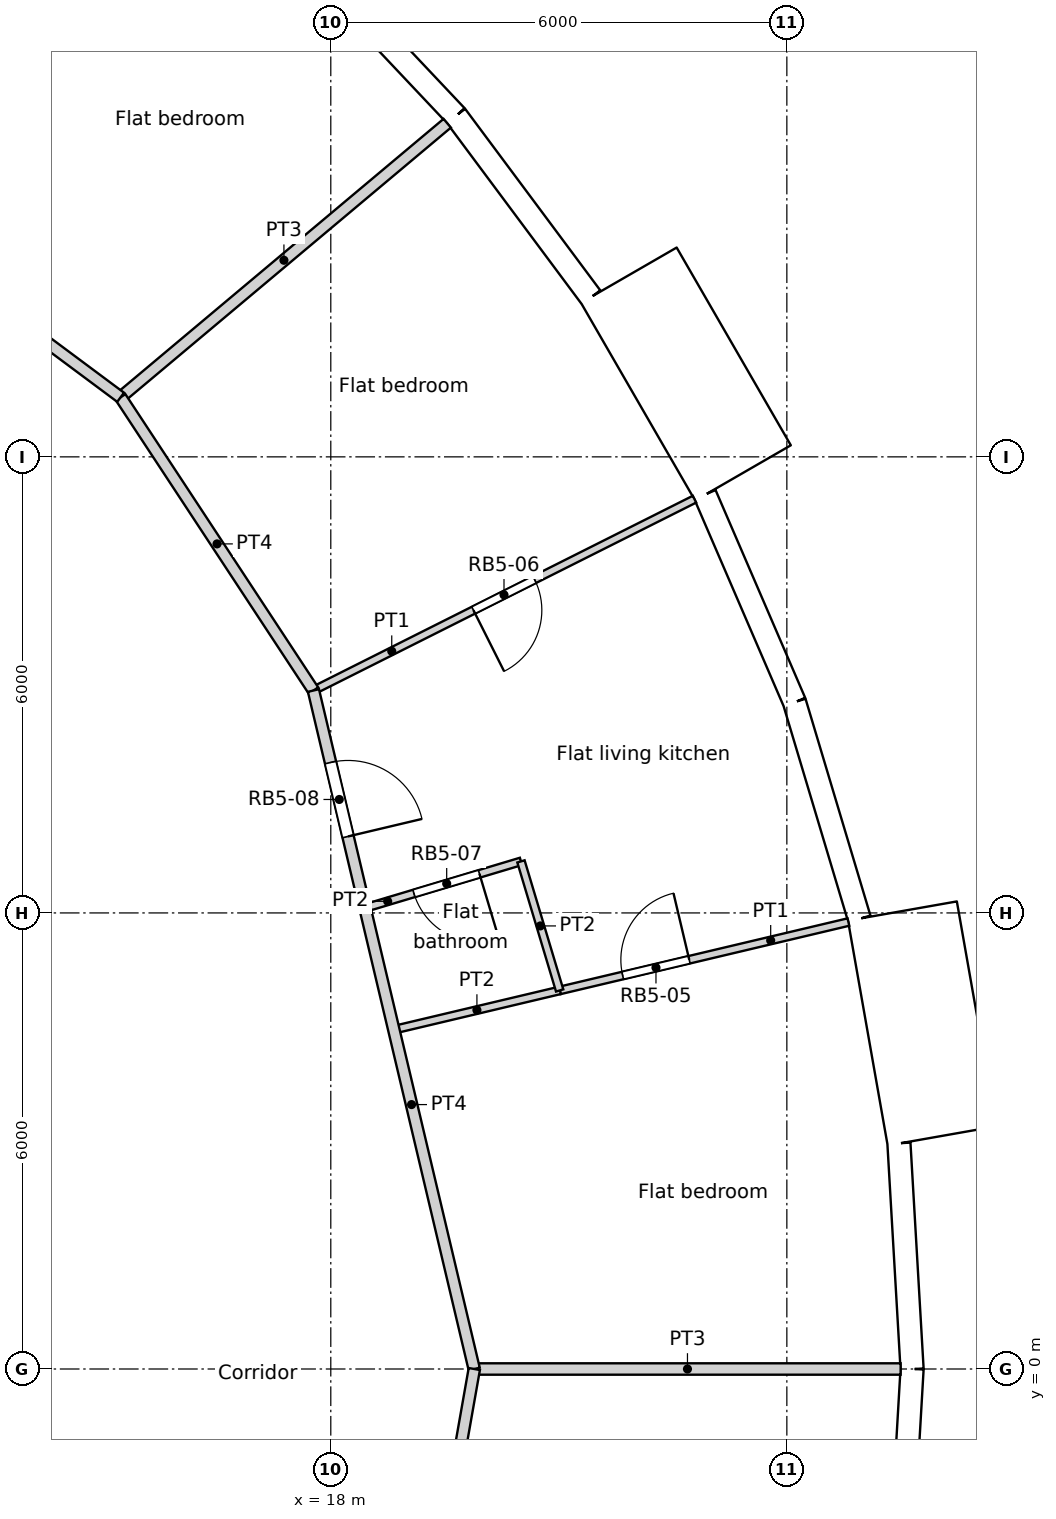
"""IFC4 building model, lengths in metres.
Left out: names, types, materials, properties, quantities, classifications, styles, units other than length and angle.
Written with IfcOpenShell. Run it as: python <this file> out.ifc"""

import sys

from ifc_helpers import new_model, si_unit, direction, frame, frame_2d, origin, origin_2d, place, context, subcontext, project, spatial, rectangle, circle, extrude, element, fill, save


model = new_model("IFC4")
c1 = context("Model", 3, precision=1e-05, world=origin(), true_north=direction((0.0, 1.0)))
c2 = subcontext(c1, "Body", "Model", "MODEL_VIEW")
j1 = project(units=[si_unit("LENGTHUNIT", "METRE"), si_unit("PLANEANGLEUNIT", "RADIAN")], contexts=[c1])
p1 = place(None, origin())
s1 = spatial("IfcSite", under=j1, at=p1, CompositionType="ELEMENT")
p2 = place(p1, origin())
s2 = spatial("IfcBuilding", under=s1, at=p2, CompositionType="ELEMENT")
p3 = place(p2, frame((0.0, 0.0, 169.2)))
s3 = spatial("IfcBuildingStorey", under=s2, at=p3, CompositionType="ELEMENT", Elevation=169.2)
for number, where, z_axis, x_axis in (
    (1, (24.548, 0.0, 0.0), (0.0, 0.0, 1.0), (1.0, 0.0, 0.0)),
    (2, (23.886, 5.661, 0.0), (0.0, 0.0, 1.0), (1.0, 0.0, 0.0)),
    (3, (21.937, 11.017, 0.0), (0.0, 0.0, 1.0), (1.0, 0.0, 0.0)),
    (4, (18.805, 15.779, 0.0), (0.0, 0.0, 1.0), (1.0, 0.0, 0.0)),
):
    element("IfcColumn", number, at=place(p3, frame(where, z_axis=z_axis, x_axis=x_axis)), inside=s3, PredefinedType="COLUMN", context=c2, shape_type="SweptSolid", body=[
        extrude(circle(Radius=0.6, at=origin_2d()), origin(), (0.0, 0.0, 1.0), 3.6),
    ])
for number, where, z_axis, x_axis in (
    (5, (18.822, 0.0, 0.0), (0.0, 0.0, 1.0), (1.0, 0.0, 0.0)),
    (6, (17.986, 5.548, 0.0), (0.0, 0.0, 1.0), (1.0, 0.0, 0.0)),
    (7, (15.552, 10.603, 0.0), (0.0, 0.0, 1.0), (1.0, 0.0, 0.0)),
):
    element("IfcColumn", number, at=place(p3, frame(where, z_axis=z_axis, x_axis=x_axis)), inside=s3, PredefinedType="COLUMN", context=c2, shape_type="SweptSolid", body=[
        extrude(circle(Radius=0.65, at=origin_2d()), origin(), (0.0, 0.0, 1.0), 3.6),
    ])
p4 = place(p3, frame((25.647, 0.0, 0.0), z_axis=(0.0, 0.0, 1.0), x_axis=(-0.058144307138, 0.998308188661, 0.0)))
e8 = element("IfcWall", 8, at=p4, inside=s3, PredefinedType="SOLIDWALL", context=c2, shape_type="SweptSolid", body=[
    extrude(rectangle(XDim=2.973, YDim=0.3, at=frame_2d((1.486, 0.0))), origin(), (0.0, 0.0, 1.0), 3.3),
])
p5 = place(p4, frame((1.486, 0.0, 1.55)))
e9 = element("IfcOpeningElement", 9, at=p5, cuts=e8, PredefinedType="OPENING", context=c2, shape_type="SweptSolid", body=[
    extrude(circle(Radius=0.9, at=origin_2d()), frame((0.0, 0.16, 0.0), z_axis=(0.0, -1.0, 0.0), x_axis=(1.0, 0.0, 0.0)), (0.0, 0.0, 1.0), 0.32),
])
p6 = place(p3, frame((26.042, 3.069, -0.3), z_axis=(0.0, 0.0, 1.0), x_axis=(-0.173669267716, 0.984804034035, 0.0)))
e10 = element("IfcWall", 10, at=p6, inside=s3, PredefinedType="ELEMENTEDWALL", context=c2, shape_type="SweptSolid", body=[
    extrude(rectangle(XDim=3.0, YDim=1.45, at=frame_2d((1.5, 0.0))), origin(), (0.0, 0.0, 1.0), 3.6),
])
p7 = place(p6, frame((1.5, 0.0, 1.85)))
e11 = element("IfcOpeningElement", 11, at=p7, cuts=e10, PredefinedType="OPENING", context=c2, shape_type="SweptSolid", body=[
    extrude(circle(Radius=0.9, at=origin_2d()), frame((0.0, 0.735, 0.0), z_axis=(0.0, -1.0, 0.0), x_axis=(1.0, 0.0, 0.0)), (0.0, 0.0, 1.0), 1.47),
])
p8 = place(p3, frame((24.953, 5.924, 0.0), z_axis=(0.0, 0.0, 1.0), x_axis=(-0.286782750849, 0.957995643944, 0.0)))
e12 = element("IfcWall", 12, at=p8, inside=s3, PredefinedType="SOLIDWALL", context=c2, shape_type="SweptSolid", body=[
    extrude(rectangle(XDim=2.973, YDim=0.3, at=frame_2d((1.486, 0.0))), origin(), (0.0, 0.0, 1.0), 3.3),
])
p9 = place(p8, frame((1.486, 0.0, 1.55)))
e13 = element("IfcOpeningElement", 13, at=p9, cuts=e12, PredefinedType="OPENING", context=c2, shape_type="SweptSolid", body=[
    extrude(circle(Radius=0.9, at=origin_2d()), frame((0.0, 0.16, 0.0), z_axis=(0.0, -1.0, 0.0), x_axis=(1.0, 0.0, 0.0)), (0.0, 0.0, 1.0), 0.32),
])
p10 = place(p3, frame((24.101, 8.772, 0.0), z_axis=(0.0, 0.0, 1.0), x_axis=(-0.396148129016, 0.918186614952, 0.0)))
e14 = element("IfcWall", 14, at=p10, inside=s3, PredefinedType="SOLIDWALL", context=c2, shape_type="SweptSolid", body=[
    extrude(rectangle(XDim=2.973, YDim=0.3, at=frame_2d((1.486, 0.0))), origin(), (0.0, 0.0, 1.0), 3.3),
])
p11 = place(p10, frame((1.486, 0.0, 1.55)))
e15 = element("IfcOpeningElement", 15, at=p11, cuts=e14, PredefinedType="OPENING", context=c2, shape_type="SweptSolid", body=[
    extrude(circle(Radius=0.9, at=origin_2d()), frame((0.0, 0.16, 0.0), z_axis=(0.0, -1.0, 0.0), x_axis=(1.0, 0.0, 0.0)), (0.0, 0.0, 1.0), 0.32),
])
p12 = place(p3, frame((23.422, 11.791, -0.3), z_axis=(0.0, 0.0, 1.0), x_axis=(-0.499990139034, 0.866031096941, 0.0)))
e16 = element("IfcWall", 16, at=p12, inside=s3, PredefinedType="ELEMENTEDWALL", context=c2, shape_type="SweptSolid", body=[
    extrude(rectangle(XDim=3.0, YDim=1.45, at=frame_2d((1.5, 0.0))), origin(), (0.0, 0.0, 1.0), 3.6),
])
p13 = place(p12, frame((1.5, 0.0, 1.85)))
e17 = element("IfcOpeningElement", 17, at=p13, cuts=e16, PredefinedType="OPENING", context=c2, shape_type="SweptSolid", body=[
    extrude(circle(Radius=0.9, at=origin_2d()), frame((0.0, 0.735, 0.0), z_axis=(0.0, -1.0, 0.0), x_axis=(1.0, 0.0, 0.0)), (0.0, 0.0, 1.0), 1.47),
])
p14 = place(p3, frame((21.422, 14.101, 0.0), z_axis=(0.0, 0.0, 1.0), x_axis=(-0.597197580538, 0.80209416517, 0.0)))
e18 = element("IfcWall", 18, at=p14, inside=s3, PredefinedType="SOLIDWALL", context=c2, shape_type="SweptSolid", body=[
    extrude(rectangle(XDim=2.973, YDim=0.3, at=frame_2d((1.486, 0.0))), origin(), (0.0, 0.0, 1.0), 3.3),
])
p15 = place(p14, frame((1.486, 0.0, 1.55)))
e19 = element("IfcOpeningElement", 19, at=p15, cuts=e18, PredefinedType="OPENING", context=c2, shape_type="SweptSolid", body=[
    extrude(circle(Radius=0.9, at=origin_2d()), frame((0.0, 0.16, 0.0), z_axis=(0.0, -1.0, 0.0), x_axis=(1.0, 0.0, 0.0)), (0.0, 0.0, 1.0), 0.32),
])
p16 = place(p3, frame((19.647, 16.486, 0.0), z_axis=(0.0, 0.0, 1.0), x_axis=(-0.686235184166, 0.727379730273, 0.0)))
e20 = element("IfcWall", 20, at=p16, inside=s3, PredefinedType="SOLIDWALL", context=c2, shape_type="SweptSolid", body=[
    extrude(rectangle(XDim=2.973, YDim=0.3, at=frame_2d((1.486, 0.0))), origin(), (0.0, 0.0, 1.0), 3.3),
])
p17 = place(p16, frame((1.486, 0.0, 1.55)))
e21 = element("IfcOpeningElement", 21, at=p17, cuts=e20, PredefinedType="OPENING", context=c2, shape_type="SweptSolid", body=[
    extrude(circle(Radius=0.9, at=origin_2d()), frame((0.0, 0.16, 0.0), z_axis=(0.0, -1.0, 0.0), x_axis=(1.0, 0.0, 0.0)), (0.0, 0.0, 1.0), 0.32),
])
p18 = place(p3, frame((25.475, -2.968, 0.0), z_axis=(0.0, 0.0, 1.0), x_axis=(0.058144307138, 0.998308188661, 0.0)))
e22 = element("IfcWall", 22, at=p18, inside=s3, PredefinedType="SOLIDWALL", context=c2, shape_type="SweptSolid", body=[
    extrude(rectangle(XDim=2.973, YDim=0.3, at=frame_2d((1.486, 0.0))), origin(), (0.0, 0.0, 1.0), 3.3),
])
p19 = place(p18, frame((1.486, 0.0, 1.55)))
e23 = element("IfcOpeningElement", 23, at=p19, cuts=e22, PredefinedType="OPENING", context=c2, shape_type="SweptSolid", body=[
    extrude(circle(Radius=0.9, at=origin_2d()), frame((0.0, 0.16, 0.0), z_axis=(0.0, -1.0, 0.0), x_axis=(1.0, 0.0, 0.0)), (0.0, 0.0, 1.0), 0.32),
])
p20 = place(p3, frame((17.772, 8.926, 0.0), z_axis=(0.0, 0.0, 1.0), x_axis=(0.230531374136, -0.973064892769, 0.0)))
e24 = element("IfcWall", 24, at=p20, inside=s3, PredefinedType="PARTITIONING", context=c2, shape_type="SweptSolid", body=[
    extrude(rectangle(XDim=9.173, YDim=0.15, at=frame_2d((4.587, 0.0))), origin(), (0.0, 0.0, 1.0), 3.3),
])
p21 = place(p20, frame((0.973, 0.0, 0.0)))
e25 = element("IfcOpeningElement", 25, at=p21, cuts=e24, PredefinedType="OPENING", context=c2, shape_type="SweptSolid", body=[
    extrude(rectangle(XDim=1.0, YDim=2.1, at=frame_2d((0.5, 1.05))), frame((0.0, 0.075, 0.0), z_axis=(0.0, -1.0, 0.0), x_axis=(1.0, 0.0, 0.0)), (0.0, 0.0, 1.0), 0.15),
])
p22 = place(p3, frame((15.235, 12.784, 0.0), z_axis=(0.0, 0.0, 1.0), x_axis=(0.54943003049, -0.83553973071, 0.0)))
e26 = element("IfcWall", 26, at=p22, inside=s3, PredefinedType="PARTITIONING", context=c2, shape_type="SweptSolid", body=[
    extrude(rectangle(XDim=4.617, YDim=0.15, at=frame_2d((2.309, 0.0))), origin(), (0.0, 0.0, 1.0), 3.3),
])
p23 = place(p3, frame((7.877, 18.262, 0.0), z_axis=(0.0, 0.0, 1.0), x_axis=(0.802112550244, -0.597172886811, 0.0)))
e27 = element("IfcWall", 27, at=p23, inside=s3, PredefinedType="PARTITIONING", context=c2, shape_type="SweptSolid", body=[
    extrude(rectangle(XDim=9.173, YDim=0.15, at=frame_2d((4.586, 0.0))), origin(), (0.0, 0.0, 1.0), 3.3),
])
p24 = place(p23, frame((0.972, 0.0, 0.0)))
e28 = element("IfcOpeningElement", 28, at=p24, cuts=e27, PredefinedType="OPENING", context=c2, shape_type="SweptSolid", body=[
    extrude(rectangle(XDim=1.0, YDim=2.1, at=frame_2d((0.5, 1.05))), frame((0.0, 0.075, 0.0), z_axis=(0.0, -1.0, 0.0), x_axis=(1.0, 0.0, 0.0)), (0.0, 0.0, 1.0), 0.15),
])
p25 = place(p3, frame((18.688, -6.802, 0.0), z_axis=(0.0, 0.0, 1.0), x_axis=(0.173728873845, 0.98479352069, 0.0)))
e29 = element("IfcWall", 29, at=p25, inside=s3, PredefinedType="PARTITIONING", context=c2, shape_type="SweptSolid", body=[
    extrude(rectangle(XDim=6.907, YDim=0.15, at=frame_2d((3.454, 0.0))), origin(), (0.0, 0.0, 1.0), 3.3),
])
p26 = place(p3, frame((21.011, 4.98, 0.0), z_axis=(0.0, 0.0, 1.0), x_axis=(0.973073275162, 0.230495989477, 0.0)))
e30 = element("IfcWall", 30, at=p26, inside=s3, PredefinedType="PARTITIONING", context=c2, shape_type="SweptSolid", body=[
    extrude(rectangle(XDim=3.904, YDim=0.1, at=frame_2d((1.952, 0.0))), origin(), (0.0, 0.0, 1.0), 3.3),
])
p27 = place(p26, frame((0.852, 0.0, 0.0)))
e31 = element("IfcOpeningElement", 31, at=p27, cuts=e30, PredefinedType="OPENING", context=c2, shape_type="SweptSolid", body=[
    extrude(rectangle(XDim=0.9, YDim=2.1, at=frame_2d((0.45, 1.05))), frame((0.0, 0.05, 0.0), z_axis=(0.0, -1.0, 0.0), x_axis=(1.0, 0.0, 0.0)), (0.0, 0.0, 1.0), 0.1),
])
p28 = place(p3, frame((17.772, 8.926, 0.0), z_axis=(0.0, 0.0, 1.0), x_axis=(0.893668599189, 0.44872757306, 0.0)))
e32 = element("IfcWall", 32, at=p28, inside=s3, PredefinedType="PARTITIONING", context=c2, shape_type="SweptSolid", body=[
    extrude(rectangle(XDim=5.609, YDim=0.1, at=frame_2d((2.805, 0.0))), origin(), (0.0, 0.0, 1.0), 3.3),
])
p29 = place(p28, frame((2.355, 0.0, 0.0)))
e33 = element("IfcOpeningElement", 33, at=p29, cuts=e32, PredefinedType="OPENING", context=c2, shape_type="SweptSolid", body=[
    extrude(rectangle(XDim=0.9, YDim=2.1, at=frame_2d((0.45, 1.05))), frame((0.0, 0.05, 0.0), z_axis=(0.0, -1.0, 0.0), x_axis=(1.0, 0.0, 0.0)), (0.0, 0.0, 1.0), 0.1),
])
p30 = place(p3, frame((20.502, 6.678, 0.0), z_axis=(0.0, 0.0, 1.0), x_axis=(0.287158348986, -0.957883125756, 0.0)))
e34 = element("IfcWall", 34, at=p30, inside=s3, PredefinedType="PARTITIONING", context=c2, shape_type="SweptSolid", body=[
    extrude(rectangle(XDim=1.773, YDim=0.1, at=frame_2d((0.886, 0.0))), origin(), (0.0, 0.0, 1.0), 3.3),
])
p31 = place(p3, frame((18.451, 6.064, 0.0), z_axis=(0.0, 0.0, 1.0), x_axis=(0.957992466662, 0.28679336432, 0.0)))
e35 = element("IfcWall", 35, at=p31, inside=s3, PredefinedType="PARTITIONING", context=c2, shape_type="SweptSolid", body=[
    extrude(rectangle(XDim=2.141, YDim=0.1, at=frame_2d((1.07, 0.0))), origin(), (0.0, 0.0, 1.0), 3.3),
])
p32 = place(p31, frame((0.671, 0.0, 0.0)))
e36 = element("IfcOpeningElement", 36, at=p32, cuts=e35, PredefinedType="OPENING", context=c2, shape_type="SweptSolid", body=[
    extrude(rectangle(XDim=0.9, YDim=2.0, at=frame_2d((0.45, 1.0))), frame((0.0, 0.05, 0.0), z_axis=(0.0, -1.0, 0.0), x_axis=(1.0, 0.0, 0.0)), (0.0, 0.0, 1.0), 0.1),
])
p33 = place(p3, frame((18.83, 4.463, 0.0), z_axis=(0.0, 0.0, 1.0), x_axis=(0.973019293695, 0.23072376145, 0.0)))
e37 = element("IfcWall", 37, at=p33, inside=s3, PredefinedType="PARTITIONING", context=c2, shape_type="SweptSolid", body=[
    extrude(rectangle(XDim=2.245, YDim=0.1, at=frame_2d((1.123, 0.0))), origin(), (0.0, 0.0, 1.0), 3.3),
])
p34 = place(p3, frame((19.888, 0.0, 0.0), z_axis=(0.0, 0.0, 1.0), x_axis=(1.0, 0.0, 0.0)))
e38 = element("IfcWall", 38, at=p34, inside=s3, PredefinedType="PARTITIONING", context=c2, shape_type="SweptSolid", body=[
    extrude(rectangle(XDim=5.609, YDim=0.15, at=frame_2d((2.805, 0.0))), origin(), (0.0, 0.0, 1.0), 3.3),
])
p35 = place(p3, frame((15.235, 12.784, 0.0), z_axis=(0.0, 0.0, 1.0), x_axis=(0.76609059793, 0.642732600514, 0.0)))
e39 = element("IfcWall", 39, at=p35, inside=s3, PredefinedType="PARTITIONING", context=c2, shape_type="SweptSolid", body=[
    extrude(rectangle(XDim=5.609, YDim=0.15, at=frame_2d((2.804, 0.0))), origin(), (0.0, 0.0, 1.0), 3.3),
])
p36 = place(p3, frame((12.894, 17.32, 0.0), z_axis=(0.0, 0.0, 1.0), x_axis=(0.597235338427, 0.802066051229, 0.0)))
e40 = element("IfcWall", 40, at=p36, inside=s3, PredefinedType="PARTITIONING", context=c2, shape_type="SweptSolid", body=[
    extrude(rectangle(XDim=3.905, YDim=0.1, at=frame_2d((1.952, 0.0))), origin(), (0.0, 0.0, 1.0), 3.3),
])
p37 = place(p36, frame((0.853, 0.0, 0.0)))
e41 = element("IfcOpeningElement", 41, at=p37, cuts=e40, PredefinedType="OPENING", context=c2, shape_type="SweptSolid", body=[
    extrude(rectangle(XDim=0.9, YDim=2.1, at=frame_2d((0.45, 1.05))), frame((0.0, 0.05, 0.0), z_axis=(0.0, -1.0, 0.0), x_axis=(1.0, 0.0, 0.0)), (0.0, 0.0, 1.0), 0.1),
])
p38 = place(p5, origin())
e42 = element("IfcWindow", 42, at=p38, inside=s3, PartitioningType="SINGLE_PANEL", PredefinedType="WINDOW", context=c2, shape_type="SweptSolid", body=[
    extrude(circle(Radius=0.9, at=origin_2d()), frame((0.0, 0.12, 0.0), z_axis=(0.0, -1.0, 0.0), x_axis=(1.0, 0.0, 0.0)), (0.0, 0.0, 1.0), 0.1),
])
fill(e9, e42)
p39 = place(p7, origin())
e43 = element("IfcWindow", 43, at=p39, inside=s3, PartitioningType="SINGLE_PANEL", PredefinedType="WINDOW", context=c2, shape_type="SweptSolid", body=[
    extrude(circle(Radius=0.9, at=origin_2d()), frame((0.0, 0.695, 0.0), z_axis=(0.0, -1.0, 0.0), x_axis=(1.0, 0.0, 0.0)), (0.0, 0.0, 1.0), 0.1),
])
fill(e11, e43)
p40 = place(p9, origin())
e44 = element("IfcWindow", 44, at=p40, inside=s3, PartitioningType="SINGLE_PANEL", PredefinedType="WINDOW", context=c2, shape_type="SweptSolid", body=[
    extrude(circle(Radius=0.9, at=origin_2d()), frame((0.0, 0.12, 0.0), z_axis=(0.0, -1.0, 0.0), x_axis=(1.0, 0.0, 0.0)), (0.0, 0.0, 1.0), 0.1),
])
fill(e13, e44)
p41 = place(p11, origin())
e45 = element("IfcWindow", 45, at=p41, inside=s3, PartitioningType="SINGLE_PANEL", PredefinedType="WINDOW", context=c2, shape_type="SweptSolid", body=[
    extrude(circle(Radius=0.9, at=origin_2d()), frame((0.0, 0.12, 0.0), z_axis=(0.0, -1.0, 0.0), x_axis=(1.0, 0.0, 0.0)), (0.0, 0.0, 1.0), 0.1),
])
fill(e15, e45)
p42 = place(p13, origin())
e46 = element("IfcWindow", 46, at=p42, inside=s3, PartitioningType="SINGLE_PANEL", PredefinedType="WINDOW", context=c2, shape_type="SweptSolid", body=[
    extrude(circle(Radius=0.9, at=origin_2d()), frame((0.0, 0.695, 0.0), z_axis=(0.0, -1.0, 0.0), x_axis=(1.0, 0.0, 0.0)), (0.0, 0.0, 1.0), 0.1),
])
fill(e17, e46)
p43 = place(p15, origin())
e47 = element("IfcWindow", 47, at=p43, inside=s3, PartitioningType="SINGLE_PANEL", PredefinedType="WINDOW", context=c2, shape_type="SweptSolid", body=[
    extrude(circle(Radius=0.9, at=origin_2d()), frame((0.0, 0.12, 0.0), z_axis=(0.0, -1.0, 0.0), x_axis=(1.0, 0.0, 0.0)), (0.0, 0.0, 1.0), 0.1),
])
fill(e19, e47)
p44 = place(p17, origin())
e48 = element("IfcWindow", 48, at=p44, inside=s3, PartitioningType="SINGLE_PANEL", PredefinedType="WINDOW", context=c2, shape_type="SweptSolid", body=[
    extrude(circle(Radius=0.9, at=origin_2d()), frame((0.0, 0.12, 0.0), z_axis=(0.0, -1.0, 0.0), x_axis=(1.0, 0.0, 0.0)), (0.0, 0.0, 1.0), 0.1),
])
fill(e21, e48)
p45 = place(p19, origin())
e49 = element("IfcWindow", 49, at=p45, inside=s3, PartitioningType="SINGLE_PANEL", PredefinedType="WINDOW", context=c2, shape_type="SweptSolid", body=[
    extrude(circle(Radius=0.9, at=origin_2d()), frame((0.0, 0.12, 0.0), z_axis=(0.0, -1.0, 0.0), x_axis=(1.0, 0.0, 0.0)), (0.0, 0.0, 1.0), 0.1),
])
fill(e23, e49)
p46 = place(p27, origin())
e50 = element("IfcDoor", 50, at=p46, inside=s3, OperationType="SINGLE_SWING_RIGHT", PredefinedType="DOOR", context=c2, shape_type="SweptSolid", body=[
    extrude(rectangle(XDim=0.9, YDim=2.1, at=frame_2d((0.45, 1.05))), frame((0.0, 0.025, 0.0), z_axis=(0.0, -1.0, 0.0), x_axis=(1.0, 0.0, 0.0)), (0.0, 0.0, 1.0), 0.05),
])
fill(e31, e50)
p47 = place(p29, origin())
e51 = element("IfcDoor", 51, at=p47, inside=s3, OperationType="SINGLE_SWING_RIGHT", PredefinedType="DOOR", context=c2, shape_type="SweptSolid", body=[
    extrude(rectangle(XDim=0.9, YDim=2.1, at=frame_2d((0.45, 1.05))), frame((0.0, 0.025, 0.0), z_axis=(0.0, -1.0, 0.0), x_axis=(1.0, 0.0, 0.0)), (0.0, 0.0, 1.0), 0.05),
])
fill(e33, e51)
p48 = place(p32, origin())
e52 = element("IfcDoor", 52, at=p48, inside=s3, OperationType="SINGLE_SWING_LEFT", PredefinedType="DOOR", context=c2, shape_type="SweptSolid", body=[
    extrude(rectangle(XDim=0.9, YDim=2.0, at=frame_2d((0.45, 1.0))), frame((0.0, 0.025, 0.0), z_axis=(0.0, -1.0, 0.0), x_axis=(1.0, 0.0, 0.0)), (0.0, 0.0, 1.0), 0.05),
])
fill(e36, e52)
p49 = place(p21, origin())
e53 = element("IfcDoor", 53, at=p49, inside=s3, OperationType="SINGLE_SWING_RIGHT", PredefinedType="DOOR", context=c2, shape_type="SweptSolid", body=[
    extrude(rectangle(XDim=1.0, YDim=2.1, at=frame_2d((0.5, 1.05))), frame((0.0, 0.025, 0.0), z_axis=(0.0, -1.0, 0.0), x_axis=(1.0, 0.0, 0.0)), (0.0, 0.0, 1.0), 0.05),
])
fill(e25, e53)
save(model, sys.argv[1])
